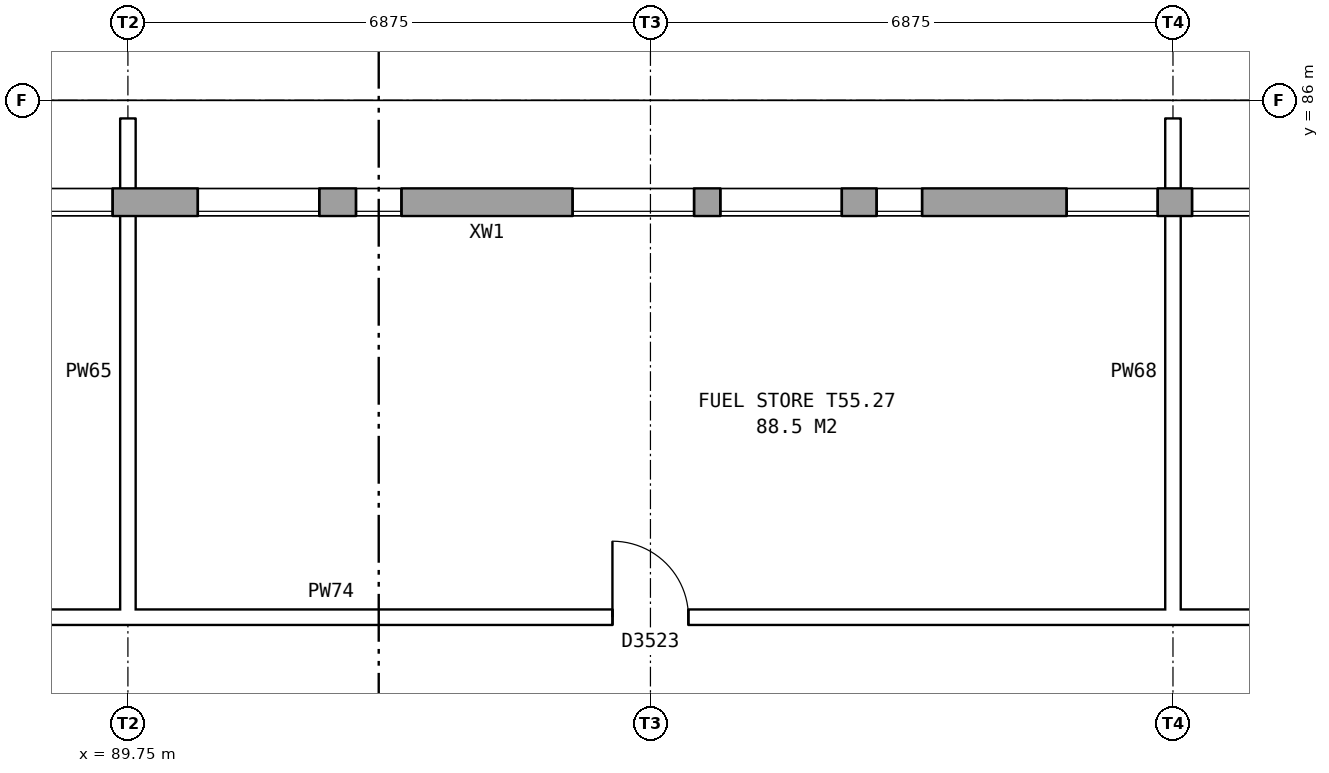
"""IFC4 building model, lengths in metres.
Left out: names, types, materials, properties, quantities, classifications, styles, units other than length and angle.
Written with IfcOpenShell. Run it as: python <this file> out.ifc"""

import sys

from ifc_helpers import new_model, si_unit, direction, frame, frame_2d, origin, place, context, subcontext, project, spatial, rectangle, extrude, element, fill, save


model = new_model("IFC4")
c1 = context("Model", 3, precision=1e-05, world=origin(), true_north=direction((0.0, 1.0)))
c2 = subcontext(c1, "Body", "Model", "MODEL_VIEW")
j1 = project(units=[si_unit("LENGTHUNIT", "METRE"), si_unit("PLANEANGLEUNIT", "RADIAN")], contexts=[c1])
p1 = place(None, origin())
s1 = spatial("IfcSite", under=j1, at=p1, CompositionType="ELEMENT")
p2 = place(p1, origin())
s2 = spatial("IfcBuilding", under=s1, at=p2, CompositionType="ELEMENT")
p3 = place(p2, frame((0.0, 0.0, 194.4)))
s3 = spatial("IfcBuildingStorey", under=s2, at=p3, CompositionType="ELEMENT", Elevation=194.4)
p4 = place(p3, frame((130.85, 84.66, 0.0), z_axis=(0.0, 0.0, 1.0), x_axis=(-1.0, 0.0, 0.0)))
e1 = element("IfcWall", 1, at=p4, inside=s3, PredefinedType="STANDARD", context=c2, shape_type="SweptSolid", body=[
    extrude(rectangle(XDim=54.7, YDim=0.36, at=frame_2d((27.35, 0.0))), origin(), (0.0, 0.0, 1.0), 3.95),
])
p5 = place(p4, frame((0.769, 0.0, 1.5)))
e2 = element("IfcOpeningElement", 2, at=p5, cuts=e1, PredefinedType="OPENING", context=c2, shape_type="SweptSolid", body=[
    extrude(rectangle(XDim=1.6, YDim=1.2, at=frame_2d((0.8, 0.6))), frame((0.0, 0.19, 0.0), z_axis=(0.0, -1.0, 0.0), x_axis=(1.0, 0.0, 0.0)), (0.0, 0.0, 1.0), 0.38),
])
p6 = place(p4, frame((2.7, 0.0, 1.5)))
e3 = element("IfcOpeningElement", 3, at=p6, cuts=e1, PredefinedType="OPENING", context=c2, shape_type="SweptSolid", body=[
    extrude(rectangle(XDim=0.6, YDim=1.2, at=frame_2d((0.3, 0.6))), frame((0.0, 0.19, 0.0), z_axis=(0.0, -1.0, 0.0), x_axis=(1.0, 0.0, 0.0)), (0.0, 0.0, 1.0), 0.38),
])
p7 = place(p4, frame((7.644, 0.0, 1.5)))
e4 = element("IfcOpeningElement", 4, at=p7, cuts=e1, PredefinedType="OPENING", context=c2, shape_type="SweptSolid", body=[
    extrude(rectangle(XDim=1.6, YDim=1.2, at=frame_2d((0.8, 0.6))), frame((0.0, 0.19, 0.0), z_axis=(0.0, -1.0, 0.0), x_axis=(1.0, 0.0, 0.0)), (0.0, 0.0, 1.0), 0.38),
])
p8 = place(p4, frame((5.3, 0.0, 1.5)))
e5 = element("IfcOpeningElement", 5, at=p8, cuts=e1, PredefinedType="OPENING", context=c2, shape_type="SweptSolid", body=[
    extrude(rectangle(XDim=1.6, YDim=1.2, at=frame_2d((0.8, 0.6))), frame((0.0, 0.19, 0.0), z_axis=(0.0, -1.0, 0.0), x_axis=(1.0, 0.0, 0.0)), (0.0, 0.0, 1.0), 0.38),
])
p9 = place(p4, frame((14.519, 0.0, 1.5)))
e6 = element("IfcOpeningElement", 6, at=p9, cuts=e1, PredefinedType="OPENING", context=c2, shape_type="SweptSolid", body=[
    extrude(rectangle(XDim=1.6, YDim=1.2, at=frame_2d((0.8, 0.6))), frame((0.0, 0.19, 0.0), z_axis=(0.0, -1.0, 0.0), x_axis=(1.0, 0.0, 0.0)), (0.0, 0.0, 1.0), 0.38),
])
p10 = place(p4, frame((16.45, 0.0, 1.5)))
e7 = element("IfcOpeningElement", 7, at=p10, cuts=e1, PredefinedType="OPENING", context=c2, shape_type="SweptSolid", body=[
    extrude(rectangle(XDim=0.6, YDim=1.2, at=frame_2d((0.3, 0.6))), frame((0.0, 0.19, 0.0), z_axis=(0.0, -1.0, 0.0), x_axis=(1.0, 0.0, 0.0)), (0.0, 0.0, 1.0), 0.38),
])
p11 = place(p4, frame((21.394, 0.0, 1.5)))
e8 = element("IfcOpeningElement", 8, at=p11, cuts=e1, PredefinedType="OPENING", context=c2, shape_type="SweptSolid", body=[
    extrude(rectangle(XDim=1.6, YDim=1.2, at=frame_2d((0.8, 0.6))), frame((0.0, 0.19, 0.0), z_axis=(0.0, -1.0, 0.0), x_axis=(1.0, 0.0, 0.0)), (0.0, 0.0, 1.0), 0.38),
])
p12 = place(p4, frame((19.05, 0.0, 1.5)))
e9 = element("IfcOpeningElement", 9, at=p12, cuts=e1, PredefinedType="OPENING", context=c2, shape_type="SweptSolid", body=[
    extrude(rectangle(XDim=1.6, YDim=1.2, at=frame_2d((0.8, 0.6))), frame((0.0, 0.19, 0.0), z_axis=(0.0, -1.0, 0.0), x_axis=(1.0, 0.0, 0.0)), (0.0, 0.0, 1.0), 0.38),
])
p13 = place(p4, frame((27.55, 0.0, 1.5)))
e10 = element("IfcOpeningElement", 10, at=p13, cuts=e1, PredefinedType="OPENING", context=c2, shape_type="SweptSolid", body=[
    extrude(rectangle(XDim=1.2, YDim=1.2, at=frame_2d((0.6, 0.6))), frame((0.0, 0.19, 0.0), z_axis=(0.0, -1.0, 0.0), x_axis=(1.0, 0.0, 0.0)), (0.0, 0.0, 1.0), 0.38),
])
p14 = place(p4, frame((31.706, 0.0, 1.5)))
e11 = element("IfcOpeningElement", 11, at=p14, cuts=e1, PredefinedType="OPENING", context=c2, shape_type="SweptSolid", body=[
    extrude(rectangle(XDim=1.6, YDim=1.2, at=frame_2d((0.8, 0.6))), frame((0.0, 0.19, 0.0), z_axis=(0.0, -1.0, 0.0), x_axis=(1.0, 0.0, 0.0)), (0.0, 0.0, 1.0), 0.38),
])
p15 = place(p4, frame((30.65, 0.0, 1.5)))
e12 = element("IfcOpeningElement", 12, at=p15, cuts=e1, PredefinedType="OPENING", context=c2, shape_type="SweptSolid", body=[
    extrude(rectangle(XDim=0.6, YDim=1.2, at=frame_2d((0.3, 0.6))), frame((0.0, 0.19, 0.0), z_axis=(0.0, -1.0, 0.0), x_axis=(1.0, 0.0, 0.0)), (0.0, 0.0, 1.0), 0.38),
])
p16 = place(p4, frame((38.581, 0.0, 1.5)))
e13 = element("IfcOpeningElement", 13, at=p16, cuts=e1, PredefinedType="OPENING", context=c2, shape_type="SweptSolid", body=[
    extrude(rectangle(XDim=1.6, YDim=1.2, at=frame_2d((0.8, 0.6))), frame((0.0, 0.19, 0.0), z_axis=(0.0, -1.0, 0.0), x_axis=(1.0, 0.0, 0.0)), (0.0, 0.0, 1.0), 0.38),
])
p17 = place(p4, frame((41.3, 0.0, 1.5)))
e14 = element("IfcOpeningElement", 14, at=p17, cuts=e1, PredefinedType="OPENING", context=c2, shape_type="SweptSolid", body=[
    extrude(rectangle(XDim=1.2, YDim=1.2, at=frame_2d((0.6, 0.6))), frame((0.0, 0.19, 0.0), z_axis=(0.0, -1.0, 0.0), x_axis=(1.0, 0.0, 0.0)), (0.0, 0.0, 1.0), 0.38),
])
p18 = place(p4, frame((45.456, 0.0, 1.5)))
e15 = element("IfcOpeningElement", 15, at=p18, cuts=e1, PredefinedType="OPENING", context=c2, shape_type="SweptSolid", body=[
    extrude(rectangle(XDim=1.6, YDim=1.2, at=frame_2d((0.8, 0.6))), frame((0.0, 0.19, 0.0), z_axis=(0.0, -1.0, 0.0), x_axis=(1.0, 0.0, 0.0)), (0.0, 0.0, 1.0), 0.38),
])
p19 = place(p4, frame((44.4, 0.0, 1.5)))
e16 = element("IfcOpeningElement", 16, at=p19, cuts=e1, PredefinedType="OPENING", context=c2, shape_type="SweptSolid", body=[
    extrude(rectangle(XDim=0.6, YDim=1.2, at=frame_2d((0.3, 0.6))), frame((0.0, 0.19, 0.0), z_axis=(0.0, -1.0, 0.0), x_axis=(1.0, 0.0, 0.0)), (0.0, 0.0, 1.0), 0.38),
])
p20 = place(p4, frame((52.331, 0.0, 1.5)))
e17 = element("IfcOpeningElement", 17, at=p20, cuts=e1, PredefinedType="OPENING", context=c2, shape_type="SweptSolid", body=[
    extrude(rectangle(XDim=1.6, YDim=1.2, at=frame_2d((0.8, 0.6))), frame((0.0, 0.19, 0.0), z_axis=(0.0, -1.0, 0.0), x_axis=(1.0, 0.0, 0.0)), (0.0, 0.0, 1.0), 0.38),
])
p21 = place(p4, frame((9.55, 0.0, 1.5)))
e18 = element("IfcOpeningElement", 18, at=p21, cuts=e1, PredefinedType="OPENING", context=c2, shape_type="SweptSolid", body=[
    extrude(rectangle(XDim=0.6, YDim=1.2, at=frame_2d((0.3, 0.6))), frame((0.0, 0.19, 0.0), z_axis=(0.0, -1.0, 0.0), x_axis=(1.0, 0.0, 0.0)), (0.0, 0.0, 1.0), 0.38),
])
p22 = place(p4, frame((12.15, 0.0, 1.5)))
e19 = element("IfcOpeningElement", 19, at=p22, cuts=e1, PredefinedType="OPENING", context=c2, shape_type="SweptSolid", body=[
    extrude(rectangle(XDim=1.2, YDim=1.2, at=frame_2d((0.6, 0.6))), frame((0.0, 0.19, 0.0), z_axis=(0.0, -1.0, 0.0), x_axis=(1.0, 0.0, 0.0)), (0.0, 0.0, 1.0), 0.38),
])
p23 = place(p4, frame((23.3, 0.0, 1.5)))
e20 = element("IfcOpeningElement", 20, at=p23, cuts=e1, PredefinedType="OPENING", context=c2, shape_type="SweptSolid", body=[
    extrude(rectangle(XDim=0.6, YDim=1.2, at=frame_2d((0.3, 0.6))), frame((0.0, 0.19, 0.0), z_axis=(0.0, -1.0, 0.0), x_axis=(1.0, 0.0, 0.0)), (0.0, 0.0, 1.0), 0.38),
])
p24 = place(p4, frame((25.9, 0.0, 1.5)))
e21 = element("IfcOpeningElement", 21, at=p24, cuts=e1, PredefinedType="OPENING", context=c2, shape_type="SweptSolid", body=[
    extrude(rectangle(XDim=1.2, YDim=1.2, at=frame_2d((0.6, 0.6))), frame((0.0, 0.19, 0.0), z_axis=(0.0, -1.0, 0.0), x_axis=(1.0, 0.0, 0.0)), (0.0, 0.0, 1.0), 0.38),
])
p25 = place(p4, frame((33.65, 0.0, 1.5)))
e22 = element("IfcOpeningElement", 22, at=p25, cuts=e1, PredefinedType="OPENING", context=c2, shape_type="SweptSolid", body=[
    extrude(rectangle(XDim=1.6, YDim=1.2, at=frame_2d((0.8, 0.6))), frame((0.0, 0.19, 0.0), z_axis=(0.0, -1.0, 0.0), x_axis=(1.0, 0.0, 0.0)), (0.0, 0.0, 1.0), 0.38),
])
p26 = place(p4, frame((37.5, 0.0, 1.5)))
e23 = element("IfcOpeningElement", 23, at=p26, cuts=e1, PredefinedType="OPENING", context=c2, shape_type="SweptSolid", body=[
    extrude(rectangle(XDim=0.6, YDim=1.2, at=frame_2d((0.3, 0.6))), frame((0.0, 0.19, 0.0), z_axis=(0.0, -1.0, 0.0), x_axis=(1.0, 0.0, 0.0)), (0.0, 0.0, 1.0), 0.38),
])
p27 = place(p4, frame((47.4, 0.0, 1.5)))
e24 = element("IfcOpeningElement", 24, at=p27, cuts=e1, PredefinedType="OPENING", context=c2, shape_type="SweptSolid", body=[
    extrude(rectangle(XDim=1.6, YDim=1.2, at=frame_2d((0.8, 0.6))), frame((0.0, 0.19, 0.0), z_axis=(0.0, -1.0, 0.0), x_axis=(1.0, 0.0, 0.0)), (0.0, 0.0, 1.0), 0.38),
])
p28 = place(p4, frame((51.25, 0.0, 1.5)))
e25 = element("IfcOpeningElement", 25, at=p28, cuts=e1, PredefinedType="OPENING", context=c2, shape_type="SweptSolid", body=[
    extrude(rectangle(XDim=0.6, YDim=1.2, at=frame_2d((0.3, 0.6))), frame((0.0, 0.19, 0.0), z_axis=(0.0, -1.0, 0.0), x_axis=(1.0, 0.0, 0.0)), (0.0, 0.0, 1.0), 0.38),
])
p29 = place(p3, frame((32.24, 79.2, 0.0), z_axis=(0.0, 0.0, 1.0), x_axis=(1.0, 0.0, 0.0)))
e26 = element("IfcWall", 26, at=p29, inside=s3, PredefinedType="PARTITIONING", context=c2, shape_type="SweptSolid", body=[
    extrude(rectangle(XDim=57.61, YDim=0.2, at=frame_2d((28.805, 0.0))), origin(), (0.0, 0.0, 1.0), 3.95),
])
p30 = place(p29, frame((3.44, 0.0, 0.0)))
e27 = element("IfcOpeningElement", 27, at=p30, cuts=e26, PredefinedType="OPENING", context=c2, shape_type="SweptSolid", body=[
    extrude(rectangle(XDim=1.0, YDim=2.1, at=frame_2d((0.5, 1.05))), frame((0.0, 0.11, 0.0), z_axis=(0.0, -1.0, 0.0), x_axis=(1.0, 0.0, 0.0)), (0.0, 0.0, 1.0), 0.22),
])
p31 = place(p29, frame((13.26, 0.0, 0.0)))
e28 = element("IfcOpeningElement", 28, at=p31, cuts=e26, PredefinedType="OPENING", context=c2, shape_type="SweptSolid", body=[
    extrude(rectangle(XDim=1.0, YDim=2.1, at=frame_2d((0.5, 1.05))), frame((0.0, 0.11, 0.0), z_axis=(0.0, -1.0, 0.0), x_axis=(1.0, 0.0, 0.0)), (0.0, 0.0, 1.0), 0.22),
])
p32 = place(p29, frame((25.26, 0.0, 0.0)))
e29 = element("IfcOpeningElement", 29, at=p32, cuts=e26, PredefinedType="OPENING", context=c2, shape_type="SweptSolid", body=[
    extrude(rectangle(XDim=1.0, YDim=2.1, at=frame_2d((0.5, 1.05))), frame((0.0, 0.11, 0.0), z_axis=(0.0, -1.0, 0.0), x_axis=(1.0, 0.0, 0.0)), (0.0, 0.0, 1.0), 0.22),
])
p33 = place(p29, frame((37.08, 0.0, 0.0)))
e30 = element("IfcOpeningElement", 30, at=p33, cuts=e26, PredefinedType="OPENING", context=c2, shape_type="SweptSolid", body=[
    extrude(rectangle(XDim=1.0, YDim=2.1, at=frame_2d((0.5, 1.05))), frame((0.0, 0.11, 0.0), z_axis=(0.0, -1.0, 0.0), x_axis=(1.0, 0.0, 0.0)), (0.0, 0.0, 1.0), 0.22),
])
p34 = place(p29, frame((49.955, 0.0, 0.0)))
e31 = element("IfcOpeningElement", 31, at=p34, cuts=e26, PredefinedType="OPENING", context=c2, shape_type="SweptSolid", body=[
    extrude(rectangle(XDim=1.0, YDim=2.1, at=frame_2d((0.5, 1.05))), frame((0.0, 0.11, 0.0), z_axis=(0.0, -1.0, 0.0), x_axis=(1.0, 0.0, 0.0)), (0.0, 0.0, 1.0), 0.22),
])
p35 = place(p3, frame((103.4, 79.2, 0.0), z_axis=(0.0, 0.0, 1.0), x_axis=(1.0, 0.0, 0.0)))
e32 = element("IfcWall", 32, at=p35, inside=s3, PredefinedType="PARTITIONING", context=c2, shape_type="SweptSolid", body=[
    extrude(rectangle(XDim=65.36, YDim=0.2, at=frame_2d((32.68, 0.0))), origin(), (0.0, 0.0, 1.0), 3.95),
])
p36 = place(p35, frame((6.475, 0.0, 0.0)))
e33 = element("IfcOpeningElement", 33, at=p36, cuts=e32, PredefinedType="OPENING", context=c2, shape_type="SweptSolid", body=[
    extrude(rectangle(XDim=1.0, YDim=2.1, at=frame_2d((0.5, 1.05))), frame((0.0, 0.11, 0.0), z_axis=(0.0, -1.0, 0.0), x_axis=(1.0, 0.0, 0.0)), (0.0, 0.0, 1.0), 0.22),
])
p37 = place(p35, frame((20.405, 0.0, 0.0)))
e34 = element("IfcOpeningElement", 34, at=p37, cuts=e32, PredefinedType="OPENING", context=c2, shape_type="SweptSolid", body=[
    extrude(rectangle(XDim=1.0, YDim=2.1, at=frame_2d((0.5, 1.05))), frame((0.0, 0.11, 0.0), z_axis=(0.0, -1.0, 0.0), x_axis=(1.0, 0.0, 0.0)), (0.0, 0.0, 1.0), 0.22),
])
p38 = place(p35, frame((33.28, 0.0, 0.0)))
e35 = element("IfcOpeningElement", 35, at=p38, cuts=e32, PredefinedType="OPENING", context=c2, shape_type="SweptSolid", body=[
    extrude(rectangle(XDim=1.0, YDim=2.1, at=frame_2d((0.5, 1.05))), frame((0.0, 0.11, 0.0), z_axis=(0.0, -1.0, 0.0), x_axis=(1.0, 0.0, 0.0)), (0.0, 0.0, 1.0), 0.22),
])
p39 = place(p35, frame((45.1, 0.0, 0.0)))
e36 = element("IfcOpeningElement", 36, at=p39, cuts=e32, PredefinedType="OPENING", context=c2, shape_type="SweptSolid", body=[
    extrude(rectangle(XDim=1.0, YDim=2.1, at=frame_2d((0.5, 1.05))), frame((0.0, 0.11, 0.0), z_axis=(0.0, -1.0, 0.0), x_axis=(1.0, 0.0, 0.0)), (0.0, 0.0, 1.0), 0.22),
])
p40 = place(p35, frame((57.92, 0.0, 0.0)))
e37 = element("IfcOpeningElement", 37, at=p40, cuts=e32, PredefinedType="OPENING", context=c2, shape_type="SweptSolid", body=[
    extrude(rectangle(XDim=1.0, YDim=2.1, at=frame_2d((0.5, 1.05))), frame((0.0, 0.11, 0.0), z_axis=(0.0, -1.0, 0.0), x_axis=(1.0, 0.0, 0.0)), (0.0, 0.0, 1.0), 0.22),
])
p41 = place(p3, frame((89.65, 79.2, 0.0), z_axis=(0.0, 0.0, 1.0), x_axis=(1.0, 0.0, 0.0)))
e38 = element("IfcWall", 38, at=p41, inside=s3, PredefinedType="PARTITIONING", context=c2, shape_type="SweptSolid", body=[
    extrude(rectangle(XDim=13.95, YDim=0.2, at=frame_2d((6.975, 0.0))), origin(), (0.0, 0.0, 1.0), 3.95),
])
p42 = place(p41, frame((6.475, 0.0, 0.0)))
e39 = element("IfcOpeningElement", 39, at=p42, cuts=e38, PredefinedType="OPENING", context=c2, shape_type="SweptSolid", body=[
    extrude(rectangle(XDim=1.0, YDim=2.1, at=frame_2d((0.5, 1.05))), frame((0.0, 0.11, 0.0), z_axis=(0.0, -1.0, 0.0), x_axis=(1.0, 0.0, 0.0)), (0.0, 0.0, 1.0), 0.22),
])
for number, where, z_axis, x_axis in (
    (40, (89.75, 79.1, 0.0), (0.0, 0.0, 1.0), (0.0, 1.0, 0.0)),
    (41, (103.5, 79.1, 0.0), (0.0, 0.0, 1.0), (0.0, 1.0, 0.0)),
):
    element("IfcWall", number, at=place(p3, frame(where, z_axis=z_axis, x_axis=x_axis)), inside=s3, PredefinedType="PARTITIONING", context=c2, shape_type="SweptSolid", body=[
        extrude(rectangle(XDim=6.66, YDim=0.2, at=frame_2d((3.33, 0.0))), origin(), (0.0, 0.0, 1.0), 3.417),
    ])
p43 = place(p13, origin())
e42 = element("IfcWindow", 42, at=p43, inside=s3, PartitioningType="DOUBLE_PANEL_HORIZONTAL", PredefinedType="WINDOW", context=c2, shape_type="SweptSolid", body=[
    extrude(rectangle(XDim=1.2, YDim=1.2, at=frame_2d((0.6, 0.6))), frame((0.0, 0.15, 0.0), z_axis=(0.0, -1.0, 0.0), x_axis=(1.0, 0.0, 0.0)), (0.0, 0.0, 1.0), 0.06),
])
fill(e10, e42)
p44 = place(p14, origin())
e43 = element("IfcWindow", 43, at=p44, inside=s3, PartitioningType="DOUBLE_PANEL_HORIZONTAL", PredefinedType="WINDOW", context=c2, shape_type="SweptSolid", body=[
    extrude(rectangle(XDim=1.6, YDim=1.2, at=frame_2d((0.8, 0.6))), frame((0.0, 0.15, 0.0), z_axis=(0.0, -1.0, 0.0), x_axis=(1.0, 0.0, 0.0)), (0.0, 0.0, 1.0), 0.06),
])
fill(e11, e43)
p45 = place(p15, origin())
e44 = element("IfcWindow", 44, at=p45, inside=s3, PartitioningType="DOUBLE_PANEL_HORIZONTAL", PredefinedType="WINDOW", context=c2, shape_type="SweptSolid", body=[
    extrude(rectangle(XDim=0.6, YDim=1.2, at=frame_2d((0.3, 0.6))), frame((0.0, 0.15, 0.0), z_axis=(0.0, -1.0, 0.0), x_axis=(1.0, 0.0, 0.0)), (0.0, 0.0, 1.0), 0.06),
])
fill(e12, e44)
p46 = place(p16, origin())
e45 = element("IfcWindow", 45, at=p46, inside=s3, PartitioningType="DOUBLE_PANEL_HORIZONTAL", PredefinedType="WINDOW", context=c2, shape_type="SweptSolid", body=[
    extrude(rectangle(XDim=1.6, YDim=1.2, at=frame_2d((0.8, 0.6))), frame((0.0, 0.15, 0.0), z_axis=(0.0, -1.0, 0.0), x_axis=(1.0, 0.0, 0.0)), (0.0, 0.0, 1.0), 0.06),
])
fill(e13, e45)
p47 = place(p17, origin())
e46 = element("IfcWindow", 46, at=p47, inside=s3, PartitioningType="DOUBLE_PANEL_HORIZONTAL", PredefinedType="WINDOW", context=c2, shape_type="SweptSolid", body=[
    extrude(rectangle(XDim=1.2, YDim=1.2, at=frame_2d((0.6, 0.6))), frame((0.0, 0.15, 0.0), z_axis=(0.0, -1.0, 0.0), x_axis=(1.0, 0.0, 0.0)), (0.0, 0.0, 1.0), 0.06),
])
fill(e14, e46)
p48 = place(p42, origin())
e47 = element("IfcDoor", 47, at=p48, inside=s3, OperationType="SINGLE_SWING_LEFT", PredefinedType="DOOR", context=c2, shape_type="SweptSolid", body=[
    extrude(rectangle(XDim=1.0, YDim=2.1, at=frame_2d((0.5, 1.05))), frame((0.0, 0.025, 0.0), z_axis=(0.0, -1.0, 0.0), x_axis=(1.0, 0.0, 0.0)), (0.0, 0.0, 1.0), 0.05),
])
fill(e39, e47)
p49 = place(p24, origin())
e48 = element("IfcWindow", 48, at=p49, inside=s3, PartitioningType="DOUBLE_PANEL_HORIZONTAL", PredefinedType="WINDOW", context=c2, shape_type="SweptSolid", body=[
    extrude(rectangle(XDim=1.2, YDim=1.2, at=frame_2d((0.6, 0.6))), frame((0.0, 0.15, 0.0), z_axis=(0.0, -1.0, 0.0), x_axis=(1.0, 0.0, 0.0)), (0.0, 0.0, 1.0), 0.06),
])
fill(e21, e48)
p50 = place(p25, origin())
e49 = element("IfcWindow", 49, at=p50, inside=s3, PartitioningType="DOUBLE_PANEL_HORIZONTAL", PredefinedType="WINDOW", context=c2, shape_type="SweptSolid", body=[
    extrude(rectangle(XDim=1.6, YDim=1.2, at=frame_2d((0.8, 0.6))), frame((0.0, 0.15, 0.0), z_axis=(0.0, -1.0, 0.0), x_axis=(1.0, 0.0, 0.0)), (0.0, 0.0, 1.0), 0.06),
])
fill(e22, e49)
p51 = place(p26, origin())
e50 = element("IfcWindow", 50, at=p51, inside=s3, PartitioningType="DOUBLE_PANEL_HORIZONTAL", PredefinedType="WINDOW", context=c2, shape_type="SweptSolid", body=[
    extrude(rectangle(XDim=0.6, YDim=1.2, at=frame_2d((0.3, 0.6))), frame((0.0, 0.15, 0.0), z_axis=(0.0, -1.0, 0.0), x_axis=(1.0, 0.0, 0.0)), (0.0, 0.0, 1.0), 0.06),
])
fill(e23, e50)
save(model, sys.argv[1])
